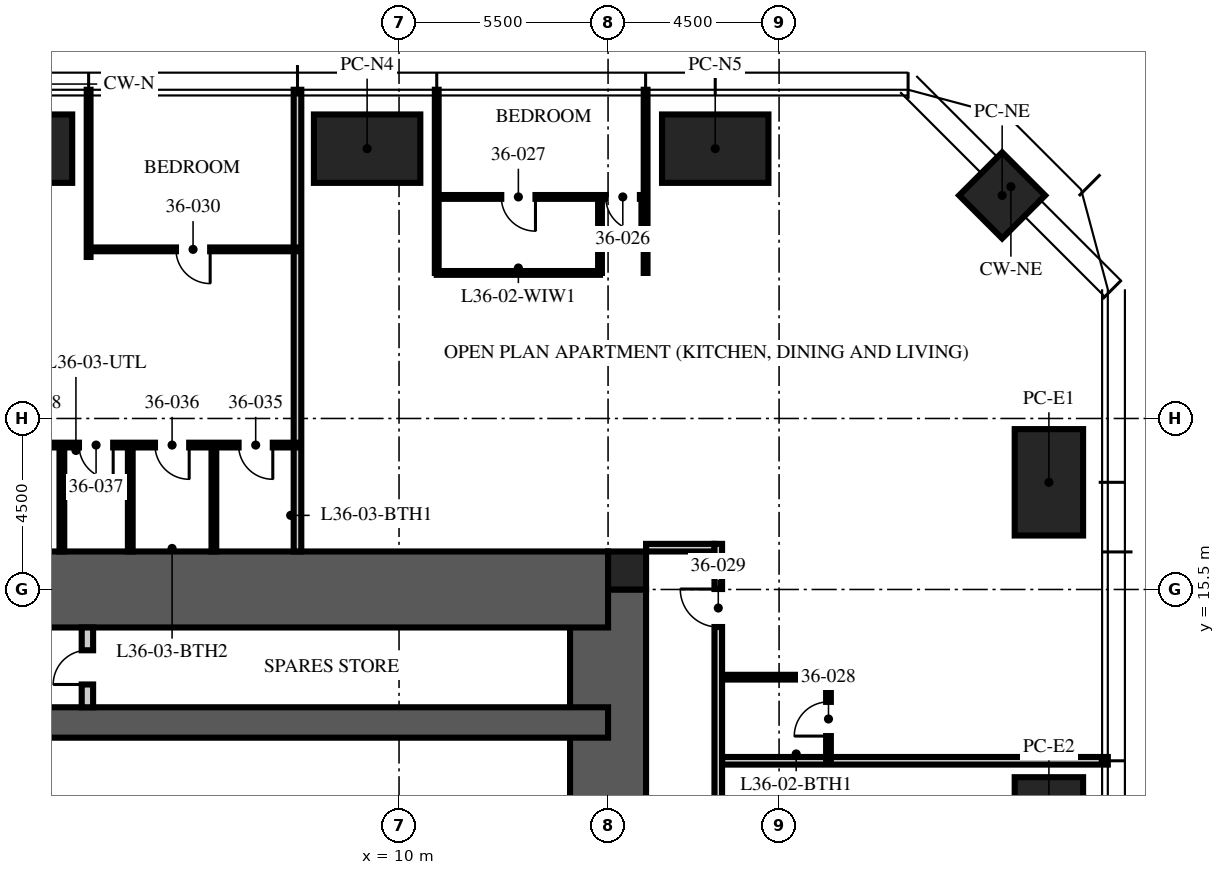
"""IFC4 building model, lengths in metres.
Left out: names, types, materials, properties, quantities, classifications, styles, units other than length and angle.
Written with IfcOpenShell. Run it as: python <this file> out.ifc"""

import sys

from ifc_helpers import new_model, si_unit, direction, frame, frame_2d, origin, origin_2d, place, context, subcontext, project, spatial, rectangle, extrude, element, fill, save


model = new_model("IFC4")
c1 = context("Model", 3, precision=1e-05, world=origin(), true_north=direction((0.0, 1.0)))
c2 = subcontext(c1, "Body", "Model", "MODEL_VIEW")
j1 = project(units=[si_unit("LENGTHUNIT", "METRE"), si_unit("PLANEANGLEUNIT", "RADIAN")], contexts=[c1])
p1 = place(None, origin())
s1 = spatial("IfcSite", under=j1, at=p1, CompositionType="ELEMENT")
p2 = place(p1, origin())
s2 = spatial("IfcBuilding", under=s1, at=p2, CompositionType="ELEMENT")
p3 = place(p2, frame((0.0, 0.0, 144.75)))
s3 = spatial("IfcBuildingStorey", under=s2, at=p3, CompositionType="ELEMENT", Elevation=144.75)
p4 = place(p3, frame((15.5, -15.5, -0.25), z_axis=(0.0, 0.0, 1.0), x_axis=(0.0, 1.0, 0.0)))
e1 = element("IfcWall", 1, at=p4, inside=s3, PredefinedType="SHEAR", context=c2, shape_type="SweptSolid", body=[
    extrude(rectangle(XDim=31.0, YDim=2.0, at=frame_2d((15.5, 0.0))), origin(), (0.0, 0.0, 1.0), 3.75),
])
p5 = place(p4, frame((6.5, 0.0, 0.25)))
e2 = element("IfcOpeningElement", 2, at=p5, cuts=e1, PredefinedType="OPENING", context=c2, shape_type="SweptSolid", body=[
    extrude(rectangle(XDim=1.2, YDim=2.1, at=frame_2d((0.6, 1.05))), frame((0.0, 1.01, 0.0), z_axis=(0.0, -1.0, 0.0), x_axis=(1.0, 0.0, 0.0)), (0.0, 0.0, 1.0), 2.02),
])
p6 = place(p4, frame((23.0, 0.0, 0.25)))
e3 = element("IfcOpeningElement", 3, at=p6, cuts=e1, PredefinedType="OPENING", context=c2, shape_type="SweptSolid", body=[
    extrude(rectangle(XDim=1.8, YDim=2.1, at=frame_2d((0.9, 1.05))), frame((0.0, 1.01, 0.0), z_axis=(0.0, -1.0, 0.0), x_axis=(1.0, 0.0, 0.0)), (0.0, 0.0, 1.0), 2.02),
])
p7 = place(p3, frame((-15.5, 15.5, -0.25), z_axis=(0.0, 0.0, 1.0), x_axis=(1.0, 0.0, 0.0)))
e4 = element("IfcWall", 4, at=p7, inside=s3, PredefinedType="SHEAR", context=c2, shape_type="SweptSolid", body=[
    extrude(rectangle(XDim=31.0, YDim=2.0, at=frame_2d((15.5, 0.0))), origin(), (0.0, 0.0, 1.0), 3.75),
])
p8 = place(p7, frame((5.0, 0.0, 0.25)))
e5 = element("IfcOpeningElement", 5, at=p8, cuts=e4, PredefinedType="OPENING", context=c2, shape_type="SweptSolid", body=[
    extrude(rectangle(XDim=1.0, YDim=2.1, at=frame_2d((0.5, 1.05))), frame((0.0, 1.01, 0.0), z_axis=(0.0, -1.0, 0.0), x_axis=(1.0, 0.0, 0.0)), (0.0, 0.0, 1.0), 2.02),
])
p9 = place(p3, frame((-15.5, 12.0, -0.25), z_axis=(0.0, 0.0, 1.0), x_axis=(1.0, 0.0, 0.0)))
e6 = element("IfcWall", 6, at=p9, inside=s3, PredefinedType="SHEAR", context=c2, shape_type="SweptSolid", body=[
    extrude(rectangle(XDim=31.0, YDim=0.8, at=frame_2d((15.5, 0.0))), origin(), (0.0, 0.0, 1.0), 3.75),
])
p10 = place(p3, frame((16.0, 16.0, -0.25), z_axis=(0.0, 0.0, 1.0), x_axis=(1.0, 0.0, 0.0)))
e7 = element("IfcColumn", 7, at=p10, inside=s3, PredefinedType="COLUMN", context=c2, shape_type="SweptSolid", body=[
    extrude(rectangle(XDim=1.0, YDim=1.0, at=origin_2d()), origin(), (0.0, 0.0, 1.0), 3.75),
])
for number, where, z_axis, x_axis in (
    (8, (0.0, 27.1, 0.0), (0.0, 0.0, 1.0), (1.0, 0.0, 0.0)),
    (9, (9.16, 27.1, 0.0), (0.0, 0.0, 1.0), (1.0, 0.0, 0.0)),
    (10, (18.32, 27.1, 0.0), (0.0, 0.0, 1.0), (1.0, 0.0, 0.0)),
    (11, (27.1, 18.32, 0.0), (0.0, 0.0, 1.0), (0.0, 1.0, 0.0)),
    (12, (27.1, 9.16, 0.0), (0.0, 0.0, 1.0), (0.0, 1.0, 0.0)),
):
    element("IfcColumn", number, at=place(p3, frame(where, z_axis=z_axis, x_axis=x_axis)), inside=s3, PredefinedType="COLUMN", context=c2, shape_type="SweptSolid", body=[
        extrude(rectangle(XDim=2.8, YDim=1.8, at=origin_2d()), origin(), (0.0, 0.0, 1.0), 3.75),
    ])
p11 = place(p3, frame((25.87, 25.87, 0.0), z_axis=(0.0, 0.0, 1.0), x_axis=(0.707106781187, -0.707106781187, 0.0)))
e13 = element("IfcColumn", 13, at=p11, inside=s3, PredefinedType="COLUMN", context=c2, shape_type="SweptSolid", body=[
    extrude(rectangle(XDim=1.6, YDim=1.6, at=origin_2d()), origin(), (0.0, 0.0, 1.0), 3.75),
])
p12 = place(p3, frame((1.8, 12.4, 0.0), z_axis=(0.0, 0.0, 1.0), x_axis=(0.0, 1.0, 0.0)))
e14 = element("IfcWall", 14, at=p12, inside=s3, PredefinedType="PARTITIONING", context=c2, shape_type="SweptSolid", body=[
    extrude(rectangle(XDim=2.1, YDim=0.3, at=frame_2d((1.05, 0.0))), origin(), (0.0, 0.0, 1.0), 3.5),
])
p13 = place(p12, frame((0.6, 0.0, 0.0)))
e15 = element("IfcOpeningElement", 15, at=p13, cuts=e14, PredefinedType="OPENING", context=c2, shape_type="SweptSolid", body=[
    extrude(rectangle(XDim=0.9, YDim=2.1, at=frame_2d((0.45, 1.05))), frame((0.0, 0.16, 0.0), z_axis=(0.0, -1.0, 0.0), x_axis=(1.0, 0.0, 0.0)), (0.0, 0.0, 1.0), 0.32),
])
p14 = place(p3, frame((16.5, 16.6, 0.0), z_axis=(0.0, 0.0, 1.0), x_axis=(1.0, 0.0, 0.0)))
e16 = element("IfcWall", 16, at=p14, inside=s3, PredefinedType="PARTITIONING", context=c2, shape_type="SweptSolid", body=[
    extrude(rectangle(XDim=1.8, YDim=0.2, at=frame_2d((0.9, 0.0))), origin(), (0.0, 0.0, 1.0), 2.3),
])
p15 = place(p3, frame((18.5, 10.992, 0.0), z_axis=(0.0, 0.0, 1.0), x_axis=(1.0, 0.0, 0.0)))
e17 = element("IfcWall", 17, at=p15, inside=s3, PredefinedType="PARTITIONING", context=c2, shape_type="SweptSolid", body=[
    extrude(rectangle(XDim=10.15, YDim=0.2, at=frame_2d((5.075, 0.0))), origin(), (0.0, 0.0, 1.0), 2.81),
])
for number, where, z_axis, x_axis in (
    (18, (16.488, 23.83, 0.0), (0.0, 0.0, 1.0), (0.0, 1.0, 0.0)),
    (19, (10.992, 23.83, 0.0), (0.0, 0.0, 1.0), (0.0, 1.0, 0.0)),
):
    element("IfcWall", number, at=place(p3, frame(where, z_axis=z_axis, x_axis=x_axis)), inside=s3, PredefinedType="PARTITIONING", context=c2, shape_type="SweptSolid", body=[
        extrude(rectangle(XDim=4.82, YDim=0.1, at=frame_2d((2.41, 0.0))), origin(), (0.0, 0.0, 1.0), 2.81),
    ])
p16 = place(p3, frame((7.328, 16.5, 0.0), z_axis=(0.0, 0.0, 1.0), x_axis=(0.0, 1.0, 0.0)))
e20 = element("IfcWall", 20, at=p16, inside=s3, PredefinedType="PARTITIONING", context=c2, shape_type="SweptSolid", body=[
    extrude(rectangle(XDim=12.15, YDim=0.2, at=frame_2d((6.075, 0.0))), origin(), (0.0, 0.0, 1.0), 2.81),
])
p17 = place(p3, frame((1.832, 24.25, 0.0), z_axis=(0.0, 0.0, 1.0), x_axis=(0.0, 1.0, 0.0)))
e21 = element("IfcWall", 21, at=p17, inside=s3, PredefinedType="PARTITIONING", context=c2, shape_type="SweptSolid", body=[
    extrude(rectangle(XDim=4.4, YDim=0.1, at=frame_2d((2.2, 0.0))), origin(), (0.0, 0.0, 1.0), 2.81),
])
p18 = place(p3, frame((16.488, 25.83, 0.0), z_axis=(0.0, 0.0, 1.0), x_axis=(-1.0, 0.0, 0.0)))
e22 = element("IfcWall", 22, at=p18, inside=s3, PredefinedType="PARTITIONING", context=c2, shape_type="SweptSolid", body=[
    extrude(rectangle(XDim=5.496, YDim=0.1, at=frame_2d((2.748, 0.0))), origin(), (0.0, 0.0, 1.0), 2.81),
])
p19 = place(p18, frame((0.15, 0.0, 0.0)))
e23 = element("IfcOpeningElement", 23, at=p19, cuts=e22, PredefinedType="OPENING", context=c2, shape_type="SweptSolid", body=[
    extrude(rectangle(XDim=0.9, YDim=2.1, at=frame_2d((0.45, 1.05))), frame((0.0, 0.06, 0.0), z_axis=(0.0, -1.0, 0.0), x_axis=(1.0, 0.0, 0.0)), (0.0, 0.0, 1.0), 0.12),
])
p20 = place(p18, frame((2.898, 0.0, 0.0)))
e24 = element("IfcOpeningElement", 24, at=p20, cuts=e22, PredefinedType="OPENING", context=c2, shape_type="SweptSolid", body=[
    extrude(rectangle(XDim=0.9, YDim=2.1, at=frame_2d((0.45, 1.05))), frame((0.0, 0.06, 0.0), z_axis=(0.0, -1.0, 0.0), x_axis=(1.0, 0.0, 0.0)), (0.0, 0.0, 1.0), 0.12),
])
p21 = place(p3, frame((15.288, 23.83, 0.0), z_axis=(0.0, 0.0, 1.0), x_axis=(0.0, 1.0, 0.0)))
e25 = element("IfcWall", 25, at=p21, inside=s3, PredefinedType="PARTITIONING", context=c2, shape_type="SweptSolid", body=[
    extrude(rectangle(XDim=2.0, YDim=0.1, at=frame_2d((1.0, 0.0))), origin(), (0.0, 0.0, 1.0), 3.5),
])
p22 = place(p3, frame((15.288, 23.83, 0.0), z_axis=(0.0, 0.0, 1.0), x_axis=(-1.0, 0.0, 0.0)))
e26 = element("IfcWall", 26, at=p22, inside=s3, PredefinedType="PARTITIONING", context=c2, shape_type="SweptSolid", body=[
    extrude(rectangle(XDim=4.296, YDim=0.1, at=frame_2d((2.148, 0.0))), origin(), (0.0, 0.0, 1.0), 2.81),
])
p23 = place(p3, frame((21.3, 10.992, 0.0), z_axis=(0.0, 0.0, 1.0), x_axis=(0.0, 1.0, 0.0)))
e27 = element("IfcWall", 27, at=p23, inside=s3, PredefinedType="PARTITIONING", context=c2, shape_type="SweptSolid", body=[
    extrude(rectangle(XDim=2.2, YDim=0.125, at=frame_2d((1.1, 0.0))), origin(), (0.0, 0.0, 1.0), 3.5),
])
p24 = place(p23, frame((0.65, 0.0, 0.0)))
e28 = element("IfcOpeningElement", 28, at=p24, cuts=e27, PredefinedType="OPENING", context=c2, shape_type="SweptSolid", body=[
    extrude(rectangle(XDim=0.9, YDim=2.1, at=frame_2d((0.45, 1.05))), frame((0.0, 0.073, 0.0), z_axis=(0.0, -1.0, 0.0), x_axis=(1.0, 0.0, 0.0)), (0.0, 0.0, 1.0), 0.145),
])
p25 = place(p3, frame((18.5, 13.192, 0.0), z_axis=(0.0, 0.0, 1.0), x_axis=(1.0, 0.0, 0.0)))
e29 = element("IfcWall", 29, at=p25, inside=s3, PredefinedType="PARTITIONING", context=c2, shape_type="SweptSolid", body=[
    extrude(rectangle(XDim=2.8, YDim=0.125, at=frame_2d((1.4, 0.0))), origin(), (0.0, 0.0, 1.0), 3.5),
])
p26 = place(p3, frame((7.328, 24.45, 0.0), z_axis=(0.0, 0.0, 1.0), x_axis=(-1.0, 0.0, 0.0)))
e30 = element("IfcWall", 30, at=p26, inside=s3, PredefinedType="PARTITIONING", context=c2, shape_type="SweptSolid", body=[
    extrude(rectangle(XDim=5.496, YDim=0.1, at=frame_2d((2.748, 0.0))), origin(), (0.0, 0.0, 1.0), 2.81),
])
p27 = place(p26, frame((2.298, 0.0, 0.0)))
e31 = element("IfcOpeningElement", 31, at=p27, cuts=e30, PredefinedType="OPENING", context=c2, shape_type="SweptSolid", body=[
    extrude(rectangle(XDim=0.9, YDim=2.1, at=frame_2d((0.45, 1.05))), frame((0.0, 0.06, 0.0), z_axis=(0.0, -1.0, 0.0), x_axis=(1.0, 0.0, 0.0)), (0.0, 0.0, 1.0), 0.12),
])
p28 = place(p3, frame((7.328, 19.3, 0.0), z_axis=(0.0, 0.0, 1.0), x_axis=(-1.0, 0.0, 0.0)))
e32 = element("IfcWall", 32, at=p28, inside=s3, PredefinedType="PARTITIONING", context=c2, shape_type="SweptSolid", body=[
    extrude(rectangle(XDim=7.7, YDim=0.125, at=frame_2d((3.85, 0.0))), origin(), (0.0, 0.0, 1.0), 2.7),
])
p29 = place(p28, frame((0.65, 0.0, 0.0)))
e33 = element("IfcOpeningElement", 33, at=p29, cuts=e32, PredefinedType="OPENING", context=c2, shape_type="SweptSolid", body=[
    extrude(rectangle(XDim=0.9, YDim=2.1, at=frame_2d((0.45, 1.05))), frame((0.0, 0.073, 0.0), z_axis=(0.0, -1.0, 0.0), x_axis=(1.0, 0.0, 0.0)), (0.0, 0.0, 1.0), 0.145),
])
p30 = place(p28, frame((2.85, 0.0, 0.0)))
e34 = element("IfcOpeningElement", 34, at=p30, cuts=e32, PredefinedType="OPENING", context=c2, shape_type="SweptSolid", body=[
    extrude(rectangle(XDim=0.9, YDim=2.1, at=frame_2d((0.45, 1.05))), frame((0.0, 0.073, 0.0), z_axis=(0.0, -1.0, 0.0), x_axis=(1.0, 0.0, 0.0)), (0.0, 0.0, 1.0), 0.145),
])
p31 = place(p28, frame((4.85, 0.0, 0.0)))
e35 = element("IfcOpeningElement", 35, at=p31, cuts=e32, PredefinedType="OPENING", context=c2, shape_type="SweptSolid", body=[
    extrude(rectangle(XDim=0.9, YDim=2.1, at=frame_2d((0.45, 1.05))), frame((0.0, 0.073, 0.0), z_axis=(0.0, -1.0, 0.0), x_axis=(1.0, 0.0, 0.0)), (0.0, 0.0, 1.0), 0.145),
])
p32 = place(p28, frame((6.5, 0.0, 0.0)))
e36 = element("IfcOpeningElement", 36, at=p32, cuts=e32, PredefinedType="OPENING", context=c2, shape_type="SweptSolid", body=[
    extrude(rectangle(XDim=0.9, YDim=2.1, at=frame_2d((0.45, 1.05))), frame((0.0, 0.073, 0.0), z_axis=(0.0, -1.0, 0.0), x_axis=(1.0, 0.0, 0.0)), (0.0, 0.0, 1.0), 0.145),
])
for number, where, z_axis, x_axis in (
    (37, (5.128, 16.5, 0.0), (0.0, 0.0, 1.0), (0.0, 1.0, 0.0)),
    (38, (2.928, 16.5, 0.0), (0.0, 0.0, 1.0), (0.0, 1.0, 0.0)),
    (39, (1.128, 16.5, 0.0), (0.0, 0.0, 1.0), (0.0, 1.0, 0.0)),
):
    element("IfcWall", number, at=place(p3, frame(where, z_axis=z_axis, x_axis=x_axis)), inside=s3, PredefinedType="PARTITIONING", context=c2, shape_type="SweptSolid", body=[
        extrude(rectangle(XDim=2.8, YDim=0.125, at=frame_2d((1.4, 0.0))), origin(), (0.0, 0.0, 1.0), 3.5),
    ])
p33 = place(p3, frame((18.4, -5.328, 0.0), z_axis=(0.0, 0.0, 1.0), x_axis=(0.0, 1.0, 0.0)))
e40 = element("IfcWall", 40, at=p33, inside=s3, PredefinedType="PARTITIONING", context=c2, shape_type="SweptSolid", body=[
    extrude(rectangle(XDim=22.028, YDim=0.2, at=frame_2d((11.014, 0.0))), origin(), (0.0, 0.0, 1.0), 2.7),
])
p34 = place(p33, frame((19.84, 0.0, 0.0)))
e41 = element("IfcOpeningElement", 41, at=p34, cuts=e40, PredefinedType="OPENING", context=c2, shape_type="SweptSolid", body=[
    extrude(rectangle(XDim=1.0, YDim=2.2, at=frame_2d((0.5, 1.1))), frame((0.0, 0.11, 0.0), z_axis=(0.0, -1.0, 0.0), x_axis=(1.0, 0.0, 0.0)), (0.0, 0.0, 1.0), 0.22),
])
p35 = place(p13, origin())
e42 = element("IfcDoor", 42, at=p35, inside=s3, OperationType="SINGLE_SWING_LEFT", PredefinedType="DOOR", context=c2, shape_type="SweptSolid", body=[
    extrude(rectangle(XDim=0.9, YDim=2.1, at=frame_2d((0.45, 1.05))), frame((0.0, 0.025, 0.0), z_axis=(0.0, -1.0, 0.0), x_axis=(1.0, 0.0, 0.0)), (0.0, 0.0, 1.0), 0.05),
])
fill(e15, e42)
p36 = place(p19, origin())
e43 = element("IfcDoor", 43, at=p36, inside=s3, OperationType="SINGLE_SWING_LEFT", PredefinedType="DOOR", context=c2, shape_type="SweptSolid", body=[
    extrude(rectangle(XDim=0.9, YDim=2.1, at=frame_2d((0.45, 1.05))), frame((0.0, 0.025, 0.0), z_axis=(0.0, -1.0, 0.0), x_axis=(1.0, 0.0, 0.0)), (0.0, 0.0, 1.0), 0.05),
])
fill(e23, e43)
p37 = place(p20, origin())
e44 = element("IfcDoor", 44, at=p37, inside=s3, OperationType="SINGLE_SWING_LEFT", PredefinedType="DOOR", context=c2, shape_type="SweptSolid", body=[
    extrude(rectangle(XDim=0.9, YDim=2.1, at=frame_2d((0.45, 1.05))), frame((0.0, 0.025, 0.0), z_axis=(0.0, -1.0, 0.0), x_axis=(1.0, 0.0, 0.0)), (0.0, 0.0, 1.0), 0.05),
])
fill(e24, e44)
p38 = place(p24, origin())
e45 = element("IfcDoor", 45, at=p38, inside=s3, OperationType="SINGLE_SWING_LEFT", PredefinedType="DOOR", context=c2, shape_type="SweptSolid", body=[
    extrude(rectangle(XDim=0.9, YDim=2.1, at=frame_2d((0.45, 1.05))), frame((0.0, 0.025, 0.0), z_axis=(0.0, -1.0, 0.0), x_axis=(1.0, 0.0, 0.0)), (0.0, 0.0, 1.0), 0.05),
])
fill(e28, e45)
p39 = place(p34, origin())
e46 = element("IfcDoor", 46, at=p39, inside=s3, OperationType="SINGLE_SWING_RIGHT", PredefinedType="DOOR", context=c2, shape_type="SweptSolid", body=[
    extrude(rectangle(XDim=1.0, YDim=2.2, at=frame_2d((0.5, 1.1))), frame((0.0, 0.025, 0.0), z_axis=(0.0, -1.0, 0.0), x_axis=(1.0, 0.0, 0.0)), (0.0, 0.0, 1.0), 0.05),
])
fill(e41, e46)
p40 = place(p27, origin())
e47 = element("IfcDoor", 47, at=p40, inside=s3, OperationType="SINGLE_SWING_LEFT", PredefinedType="DOOR", context=c2, shape_type="SweptSolid", body=[
    extrude(rectangle(XDim=0.9, YDim=2.1, at=frame_2d((0.45, 1.05))), frame((0.0, 0.025, 0.0), z_axis=(0.0, -1.0, 0.0), x_axis=(1.0, 0.0, 0.0)), (0.0, 0.0, 1.0), 0.05),
])
fill(e31, e47)
p41 = place(p29, origin())
e48 = element("IfcDoor", 48, at=p41, inside=s3, OperationType="SINGLE_SWING_LEFT", PredefinedType="DOOR", context=c2, shape_type="SweptSolid", body=[
    extrude(rectangle(XDim=0.9, YDim=2.1, at=frame_2d((0.45, 1.05))), frame((0.0, 0.025, 0.0), z_axis=(0.0, -1.0, 0.0), x_axis=(1.0, 0.0, 0.0)), (0.0, 0.0, 1.0), 0.05),
])
fill(e33, e48)
p42 = place(p30, origin())
e49 = element("IfcDoor", 49, at=p42, inside=s3, OperationType="SINGLE_SWING_LEFT", PredefinedType="DOOR", context=c2, shape_type="SweptSolid", body=[
    extrude(rectangle(XDim=0.9, YDim=2.1, at=frame_2d((0.45, 1.05))), frame((0.0, 0.025, 0.0), z_axis=(0.0, -1.0, 0.0), x_axis=(1.0, 0.0, 0.0)), (0.0, 0.0, 1.0), 0.05),
])
fill(e34, e49)
p43 = place(p31, origin())
e50 = element("IfcDoor", 50, at=p43, inside=s3, OperationType="SINGLE_SWING_LEFT", PredefinedType="DOOR", context=c2, shape_type="SweptSolid", body=[
    extrude(rectangle(XDim=0.9, YDim=2.1, at=frame_2d((0.45, 1.05))), frame((0.0, 0.025, 0.0), z_axis=(0.0, -1.0, 0.0), x_axis=(1.0, 0.0, 0.0)), (0.0, 0.0, 1.0), 0.05),
])
fill(e35, e50)
save(model, sys.argv[1])
